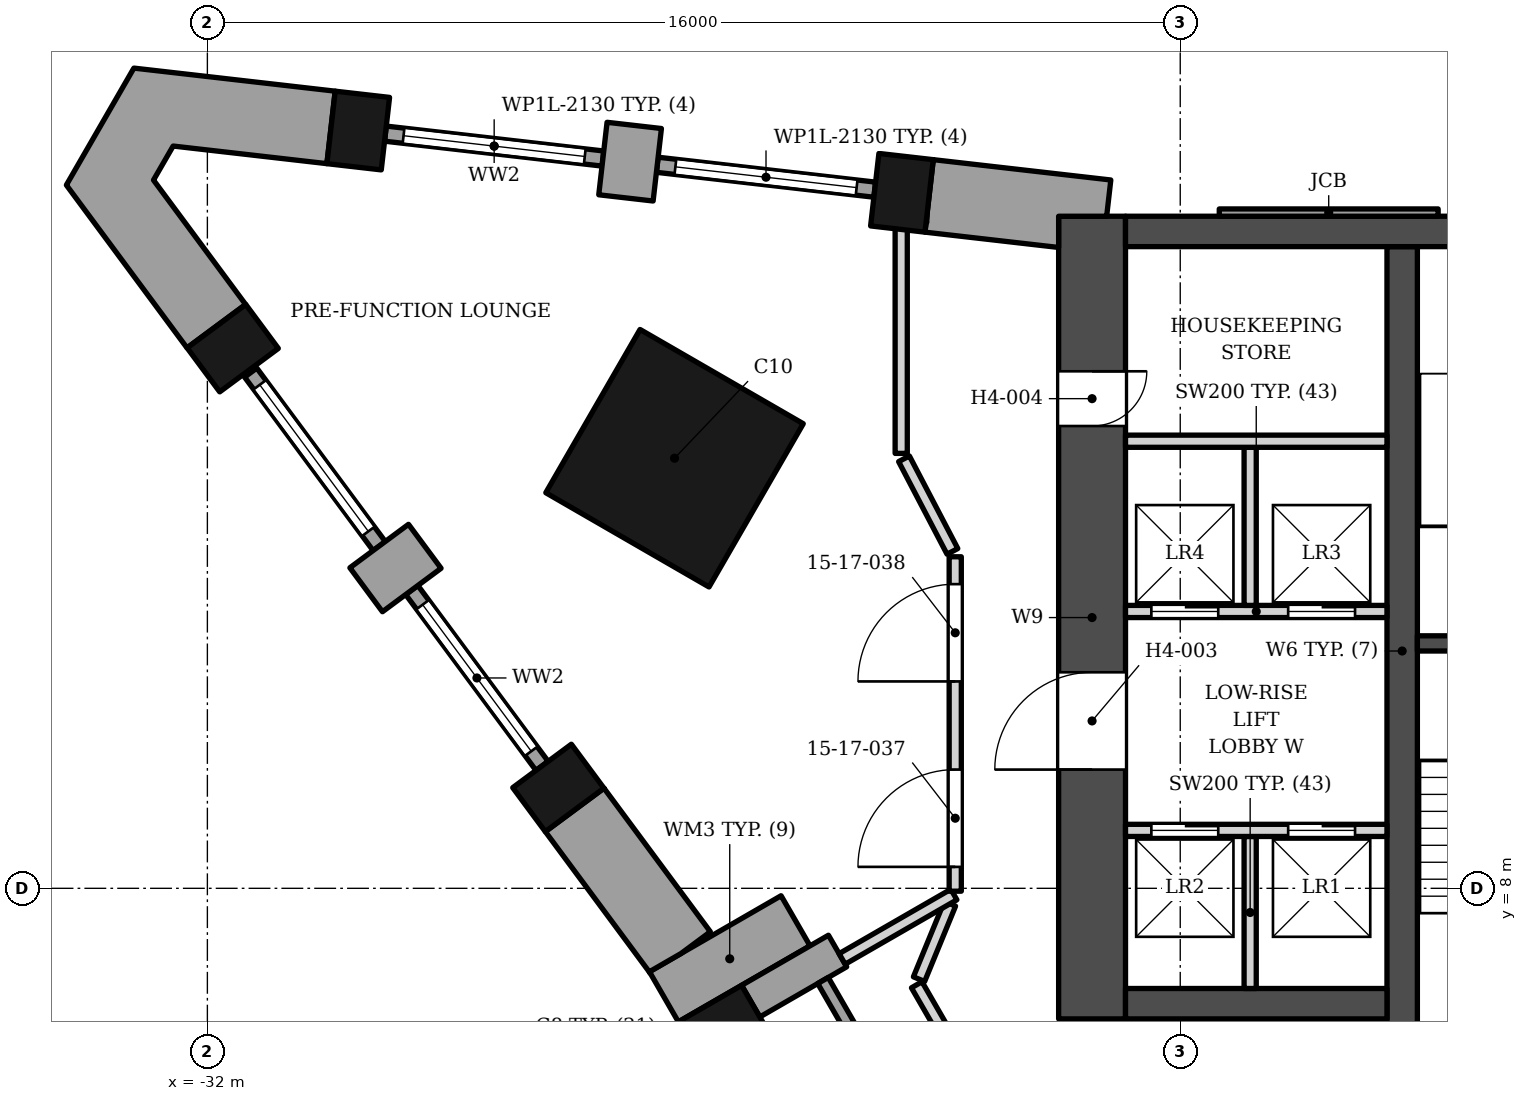
"""IFC4 building model, lengths in metres.
Left out: names, types, materials, properties, quantities, classifications, styles, units other than length and angle.
Written with IfcOpenShell. Run it as: python <this file> out.ifc"""

import sys

from ifc_helpers import new_model, si_unit, direction, frame, frame_2d, origin, origin_2d, place, context, subcontext, project, spatial, polyline, rectangle, outline, extrude, element, fill, save


model = new_model("IFC4")
c1 = context("Model", 3, precision=1e-05, world=origin(), true_north=direction((0.0, 1.0)))
c2 = subcontext(c1, "Body", "Model", "MODEL_VIEW")
j1 = project(units=[si_unit("LENGTHUNIT", "METRE"), si_unit("PLANEANGLEUNIT", "RADIAN")], contexts=[c1])
p1 = place(None, origin())
s1 = spatial("IfcSite", under=j1, at=p1, CompositionType="ELEMENT")
p2 = place(p1, origin())
s2 = spatial("IfcBuilding", under=s1, at=p2, CompositionType="ELEMENT")
p3 = place(p2, frame((0.0, 0.0, 76.6)))
s3 = spatial("IfcBuildingStorey", under=s2, at=p3, CompositionType="ELEMENT", Elevation=76.6)
p4 = place(p3, frame((-16.9, 18.802, 0.0), z_axis=(0.0, 0.0, 1.0), x_axis=(1.0, 0.0, 0.0)))
e1 = element("IfcWall", 1, at=p4, inside=s3, PredefinedType="SHEAR", context=c2, shape_type="SweptSolid", body=[
    extrude(rectangle(XDim=33.8, YDim=0.5, at=frame_2d((16.9, 0.0))), origin(), (0.0, 0.0, 1.0), 3.4),
])
p5 = place(p3, frame((-12.35, 5.253, 0.0), z_axis=(0.0, 0.0, 1.0), x_axis=(0.0, 1.0, 0.0)))
e2 = element("IfcWall", 2, at=p5, inside=s3, PredefinedType="SHEAR", context=c2, shape_type="SweptSolid", body=[
    extrude(rectangle(XDim=13.3, YDim=0.5, at=frame_2d((6.65, 0.0))), origin(), (0.0, 0.0, 1.0), 3.4),
])
p6 = place(p3, frame((-12.1, 12.028, 0.0), z_axis=(0.0, 0.0, 1.0), x_axis=(1.0, 0.0, 0.0)))
e3 = element("IfcWall", 3, at=p6, inside=s3, PredefinedType="SHEAR", context=c2, shape_type="SweptSolid", body=[
    extrude(rectangle(XDim=3.75, YDim=0.25, at=frame_2d((1.875, 0.0))), origin(), (0.0, 0.0, 1.0), 3.4),
])
p7 = place(p3, frame((-12.6, 6.103, 0.0), z_axis=(0.0, 0.0, 1.0), x_axis=(-1.0, 0.0, 0.0)))
e4 = element("IfcWall", 4, at=p7, inside=s3, PredefinedType="SHEAR", context=c2, shape_type="SweptSolid", body=[
    extrude(rectangle(XDim=4.3, YDim=0.5, at=frame_2d((2.15, 0.0))), origin(), (0.0, 0.0, 1.0), 3.4),
])
p8 = place(p3, frame((-17.45, 5.853, 0.0), z_axis=(0.0, 0.0, 1.0), x_axis=(0.0, 1.0, 0.0)))
e5 = element("IfcWall", 5, at=p8, inside=s3, PredefinedType="SHEAR", context=c2, shape_type="SweptSolid", body=[
    extrude(rectangle(XDim=13.2, YDim=1.1, at=frame_2d((6.6, 0.0))), origin(), (0.0, 0.0, 1.0), 3.4),
])
p9 = place(p8, frame((4.1, 0.0, 0.0)))
e6 = element("IfcOpeningElement", 6, at=p9, cuts=e5, PredefinedType="OPENING", context=c2, shape_type="SweptSolid", body=[
    extrude(rectangle(XDim=1.6, YDim=2.1, at=frame_2d((0.8, 1.05))), frame((0.0, 0.56, 0.0), z_axis=(0.0, -1.0, 0.0), x_axis=(1.0, 0.0, 0.0)), (0.0, 0.0, 1.0), 1.12),
])
p10 = place(p8, frame((9.75, 0.0, 0.0)))
e7 = element("IfcOpeningElement", 7, at=p10, cuts=e5, PredefinedType="OPENING", context=c2, shape_type="SweptSolid", body=[
    extrude(rectangle(XDim=0.9, YDim=2.1, at=frame_2d((0.45, 1.05))), frame((0.0, 0.56, 0.0), z_axis=(0.0, -1.0, 0.0), x_axis=(1.0, 0.0, 0.0)), (0.0, 0.0, 1.0), 1.12),
])
p11 = place(p3, frame((-24.317, 15.073, 0.0), z_axis=(0.0, 0.0, 1.0), x_axis=(0.866025412511, -0.499999984885, 0.0)))
e8 = element("IfcColumn", 8, at=p11, inside=s3, PredefinedType="COLUMN", context=c2, shape_type="SweptSolid", body=[
    extrude(rectangle(XDim=3.1, YDim=3.1, at=origin_2d()), origin(), (0.0, 0.0, 1.0), 3.4),
])
for number, where, z_axis, x_axis in (
    (9, (-23.509, 5.714, 0.0), (0.0, 0.0, 1.0), (0.5, -0.866, 0.0)),
    (10, (-20.577, 19.438, 0.0), (0.0, 0.0, 1.0), (-0.994, 0.114, 0.0)),
    (11, (-29.519, 20.462, 0.0), (0.0, 0.0, 1.0), (-0.994, 0.114, 0.0)),
    (12, (-31.583, 16.883, 0.0), (0.0, 0.0, 1.0), (0.595, -0.804, 0.0)),
    (13, (-26.228, 9.651, 0.0), (0.0, 0.0, 1.0), (0.595, -0.804, 0.0)),
):
    element("IfcColumn", number, at=place(p3, frame(where, z_axis=z_axis, x_axis=x_axis)), inside=s3, PredefinedType="COLUMN", context=c2, shape_type="SweptSolid", body=[
        extrude(rectangle(XDim=0.9, YDim=1.2, at=origin_2d()), origin(), (0.0, 0.0, 1.0), 3.4),
    ])
p12 = place(p3, frame((-21.635, 6.969, 0.0), z_axis=(0.0, 0.0, 1.0), x_axis=(-0.866040211805, -0.499974350878, 0.0)))
e14 = element("IfcWall", 14, at=p12, inside=s3, PredefinedType="SOLIDWALL", context=c2, shape_type="SweptSolid", body=[
    extrude(rectangle(XDim=1.65, YDim=0.6, at=frame_2d((0.825, 0.0))), origin(), (0.0, 0.0, 1.0), 2.65),
])
p13 = place(p3, frame((-21.875, 6.484, 0.0), z_axis=(0.0, 0.0, 1.0), x_axis=(0.49998411664, -0.866034573852, 0.0)))
e15 = element("IfcWall", 15, at=p13, inside=s3, PredefinedType="ELEMENTEDWALL", context=c2, shape_type="SweptSolid", body=[
    extrude(rectangle(XDim=4.2, YDim=0.2, at=frame_2d((2.1, 0.0))), origin(), (0.0, 0.0, 1.0), 2.45),
])
p14 = place(p3, origin())
e16 = element("IfcWall", 16, at=p14, inside=s3, PredefinedType="SOLIDWALL", context=c2, shape_type="SweptSolid", body=[
    extrude(outline(polyline([(-15.358, 19.173), (-15.358, 19.052), (-11.758, 19.052), (-11.758, 19.173), (-15.358, 19.173)])), origin(), (0.0, 0.0, 1.0), 2.65),
])
p15 = place(p3, frame((-22.327, 7.466, 0.0), z_axis=(0.0, 0.0, 1.0), x_axis=(-0.866022959057, -0.500004234368, 0.0)))
e17 = element("IfcWall", 17, at=p15, inside=s3, PredefinedType="SOLIDWALL", context=c2, shape_type="SweptSolid", body=[
    extrude(rectangle(XDim=2.5, YDim=0.952, at=frame_2d((1.25, 0.0))), origin(), (0.0, 0.0, 1.0), 2.63),
])
p16 = place(p3, frame((-25.116, 19.354, 0.0), z_axis=(0.0, 0.0, 1.0), x_axis=(0.113735952551, 0.993511013073, 0.0)))
e18 = element("IfcWall", 18, at=p16, inside=s3, PredefinedType="SOLIDWALL", context=c2, shape_type="SweptSolid", body=[
    extrude(rectangle(XDim=1.2, YDim=0.9, at=frame_2d((0.6, 0.0))), origin(), (0.0, 0.0, 1.0), 2.63),
])
p17 = place(p3, frame((-21.024, 19.489, 0.0), z_axis=(0.0, 0.0, 1.0), x_axis=(-0.993504225498, 0.113795228013, 0.0)))
e19 = element("IfcWall", 19, at=p17, inside=s3, PredefinedType="ELEMENTEDWALL", context=c2, shape_type="SweptSolid", body=[
    extrude(rectangle(XDim=3.6, YDim=0.25, at=frame_2d((1.8, 0.0))), origin(), (0.0, 0.0, 1.0), 2.63),
])
p18 = place(p17, frame((0.3, 0.0, 0.3)))
e20 = element("IfcOpeningElement", 20, at=p18, cuts=e19, PredefinedType="OPENING", context=c2, shape_type="SweptSolid", body=[
    extrude(rectangle(XDim=3.0, YDim=2.13, at=frame_2d((1.5, 1.065))), frame((0.0, 0.135, 0.0), z_axis=(0.0, -1.0, 0.0), x_axis=(1.0, 0.0, 0.0)), (0.0, 0.0, 1.0), 0.27),
])
p19 = place(p3, frame((-25.495, 20.001, 0.0), z_axis=(0.0, 0.0, 1.0), x_axis=(-0.993511890309, 0.113728289423, 0.0)))
e21 = element("IfcWall", 21, at=p19, inside=s3, PredefinedType="ELEMENTEDWALL", context=c2, shape_type="SweptSolid", body=[
    extrude(rectangle(XDim=3.6, YDim=0.25, at=frame_2d((1.8, 0.0))), origin(), (0.0, 0.0, 1.0), 2.63),
])
p20 = place(p19, frame((0.3, 0.0, 0.3)))
e22 = element("IfcOpeningElement", 22, at=p20, cuts=e21, PredefinedType="OPENING", context=c2, shape_type="SweptSolid", body=[
    extrude(rectangle(XDim=3.0, YDim=2.13, at=frame_2d((1.5, 1.065))), frame((0.0, 0.135, 0.0), z_axis=(0.0, -1.0, 0.0), x_axis=(1.0, 0.0, 0.0)), (0.0, 0.0, 1.0), 0.27),
])
p21 = place(p3, frame((-29.388, 12.91, 0.0), z_axis=(0.0, 0.0, 1.0), x_axis=(0.803477891264, 0.595334593527, 0.0)))
e23 = element("IfcWall", 23, at=p21, inside=s3, PredefinedType="SOLIDWALL", context=c2, shape_type="SweptSolid", body=[
    extrude(rectangle(XDim=1.2, YDim=0.9, at=frame_2d((0.6, 0.0))), origin(), (0.0, 0.0, 1.0), 2.63),
])
p22 = place(p3, frame((-31.288, 16.481, 0.0), z_axis=(0.0, 0.0, 1.0), x_axis=(0.595304805086, -0.803499962067, 0.0)))
e24 = element("IfcWall", 24, at=p22, inside=s3, PredefinedType="ELEMENTEDWALL", context=c2, shape_type="SweptSolid", body=[
    extrude(rectangle(XDim=3.552, YDim=0.25, at=frame_2d((1.776, 0.0))), origin(), (0.0, 0.0, 1.0), 2.63),
])
p23 = place(p22, frame((0.25, 0.0, 0.3)))
e25 = element("IfcOpeningElement", 25, at=p23, cuts=e24, PredefinedType="OPENING", context=c2, shape_type="SweptSolid", body=[
    extrude(rectangle(XDim=3.0, YDim=2.13, at=frame_2d((1.5, 1.065))), frame((0.0, 0.135, 0.0), z_axis=(0.0, -1.0, 0.0), x_axis=(1.0, 0.0, 0.0)), (0.0, 0.0, 1.0), 0.27),
])
p24 = place(p3, frame((-28.638, 12.906, 0.0), z_axis=(0.0, 0.0, 1.0), x_axis=(0.595302153335, -0.803501926715, 0.0)))
e26 = element("IfcWall", 26, at=p24, inside=s3, PredefinedType="ELEMENTEDWALL", context=c2, shape_type="SweptSolid", body=[
    extrude(rectangle(XDim=3.6, YDim=0.25, at=frame_2d((1.8, 0.0))), origin(), (0.0, 0.0, 1.0), 2.63),
])
p25 = place(p24, frame((0.3, 0.0, 0.3)))
e27 = element("IfcOpeningElement", 27, at=p25, cuts=e26, PredefinedType="OPENING", context=c2, shape_type="SweptSolid", body=[
    extrude(rectangle(XDim=3.0, YDim=2.13, at=frame_2d((1.5, 1.065))), frame((0.0, 0.135, 0.0), z_axis=(0.0, -1.0, 0.0), x_axis=(1.0, 0.0, 0.0)), (0.0, 0.0, 1.0), 0.27),
])
p26 = place(p3, origin())
e28 = element("IfcWall", 28, at=p26, inside=s3, PredefinedType="SOLIDWALL", context=c2, shape_type="SweptSolid", body=[
    extrude(outline(polyline([(-20.062, 19.983), (-20.198, 18.791), (-18.0, 18.539), (-18.0, 19.052), (-17.21, 19.052), (-17.142, 19.649), (-20.062, 19.983), (-20.062, 19.983), (-20.062, 19.983)])), origin(), (0.0, 0.0, 1.0), 2.473),
])
p27 = place(p3, origin())
e29 = element("IfcWall", 29, at=p27, inside=s3, PredefinedType="SOLIDWALL", context=c2, shape_type="SweptSolid", body=[
    extrude(outline(polyline([(-29.898, 21.109), (-33.209, 21.489), (-34.319, 19.565), (-32.335, 16.887), (-31.371, 17.602), (-32.886, 19.647), (-32.563, 20.207), (-30.034, 19.917), (-29.898, 21.109)])), origin(), (0.0, 0.0, 1.0), 2.65),
])
p28 = place(p3, origin())
e30 = element("IfcWall", 30, at=p28, inside=s3, PredefinedType="SOLIDWALL", context=c2, shape_type="SweptSolid", body=[
    extrude(outline(polyline([(-23.728, 7.285), (-25.478, 9.647), (-25.478, 9.647), (-25.478, 9.646), (-26.442, 8.933), (-24.713, 6.599), (-24.73, 6.628), (-24.21, 6.928), (-23.728, 7.285)])), origin(), (0.0, 0.0, 1.0), 2.63),
])
p29 = place(p3, frame((-14.85, 6.353, 0.0), z_axis=(0.0, 0.0, 1.0), x_axis=(0.0, 1.0, 0.0)))
e31 = element("IfcWall", 31, at=p29, inside=s3, PredefinedType="SOLIDWALL", context=c2, shape_type="SweptSolid", body=[
    extrude(rectangle(XDim=2.5, YDim=0.2, at=frame_2d((1.25, 0.0))), origin(), (0.0, 0.0, 1.0), 3.23),
])
p30 = place(p3, frame((-16.9, 8.953, 0.0), z_axis=(0.0, 0.0, 1.0), x_axis=(1.0, 0.0, 0.0)))
e32 = element("IfcWall", 32, at=p30, inside=s3, PredefinedType="SOLIDWALL", context=c2, shape_type="SweptSolid", body=[
    extrude(rectangle(XDim=4.3, YDim=0.2, at=frame_2d((2.15, 0.0))), origin(), (0.0, 0.0, 1.0), 3.23),
])
p31 = place(p30, frame((2.675, 0.0, 0.0)))
e33 = element("IfcOpeningElement", 33, at=p31, cuts=e32, PredefinedType="OPENING", context=c2, shape_type="SweptSolid", body=[
    extrude(rectangle(XDim=1.1, YDim=2.1, at=frame_2d((0.55, 1.05))), frame((0.0, 0.11, 0.0), z_axis=(0.0, -1.0, 0.0), x_axis=(1.0, 0.0, 0.0)), (0.0, 0.0, 1.0), 0.22),
])
p32 = place(p30, frame((0.425, 0.0, 0.0)))
e34 = element("IfcOpeningElement", 34, at=p32, cuts=e32, PredefinedType="OPENING", context=c2, shape_type="SweptSolid", body=[
    extrude(rectangle(XDim=1.1, YDim=2.1, at=frame_2d((0.55, 1.05))), frame((0.0, 0.11, 0.0), z_axis=(0.0, -1.0, 0.0), x_axis=(1.0, 0.0, 0.0)), (0.0, 0.0, 1.0), 0.22),
])
p33 = place(p3, frame((-16.9, 12.552, 0.0), z_axis=(0.0, 0.0, 1.0), x_axis=(1.0, 0.0, 0.0)))
e35 = element("IfcWall", 35, at=p33, inside=s3, PredefinedType="SOLIDWALL", context=c2, shape_type="SweptSolid", body=[
    extrude(rectangle(XDim=4.3, YDim=0.2, at=frame_2d((2.15, 0.0))), origin(), (0.0, 0.0, 1.0), 3.23),
])
p34 = place(p33, frame((2.675, 0.0, 0.0)))
e36 = element("IfcOpeningElement", 36, at=p34, cuts=e35, PredefinedType="OPENING", context=c2, shape_type="SweptSolid", body=[
    extrude(rectangle(XDim=1.1, YDim=2.1, at=frame_2d((0.55, 1.05))), frame((0.0, 0.11, 0.0), z_axis=(0.0, -1.0, 0.0), x_axis=(1.0, 0.0, 0.0)), (0.0, 0.0, 1.0), 0.22),
])
p35 = place(p33, frame((0.425, 0.0, 0.0)))
e37 = element("IfcOpeningElement", 37, at=p35, cuts=e35, PredefinedType="OPENING", context=c2, shape_type="SweptSolid", body=[
    extrude(rectangle(XDim=1.1, YDim=2.1, at=frame_2d((0.55, 1.05))), frame((0.0, 0.11, 0.0), z_axis=(0.0, -1.0, 0.0), x_axis=(1.0, 0.0, 0.0)), (0.0, 0.0, 1.0), 0.22),
])
p36 = place(p3, frame((-14.85, 12.653, 0.0), z_axis=(0.0, 0.0, 1.0), x_axis=(0.0, 1.0, 0.0)))
e38 = element("IfcWall", 38, at=p36, inside=s3, PredefinedType="SOLIDWALL", context=c2, shape_type="SweptSolid", body=[
    extrude(rectangle(XDim=2.6, YDim=0.2, at=frame_2d((1.3, 0.0))), origin(), (0.0, 0.0, 1.0), 3.23),
])
p37 = place(p3, frame((-16.9, 15.353, 0.0), z_axis=(0.0, 0.0, 1.0), x_axis=(1.0, 0.0, 0.0)))
e39 = element("IfcWall", 39, at=p37, inside=s3, PredefinedType="SOLIDWALL", context=c2, shape_type="SweptSolid", body=[
    extrude(rectangle(XDim=4.3, YDim=0.2, at=frame_2d((2.15, 0.0))), origin(), (0.0, 0.0, 1.0), 3.23),
])
p38 = place(p3, frame((-20.334, 6.414, 0.0), z_axis=(0.0, 0.0, 1.0), x_axis=(0.499991774685, -0.86603015262, 0.0)))
e40 = element("IfcWall", 40, at=p38, inside=s3, PredefinedType="PARTITIONING", context=c2, shape_type="SweptSolid", body=[
    extrude(rectangle(XDim=2.903, YDim=0.2, at=frame_2d((1.452, 0.0))), origin(), (0.0, 0.0, 1.0), 2.45),
])
p39 = place(p38, frame((1.002, 0.0, 0.0)))
e41 = element("IfcOpeningElement", 41, at=p39, cuts=e40, PredefinedType="OPENING", context=c2, shape_type="SweptSolid", body=[
    extrude(rectangle(XDim=0.9, YDim=2.1, at=frame_2d((0.45, 1.05))), frame((0.0, 0.11, 0.0), z_axis=(0.0, -1.0, 0.0), x_axis=(1.0, 0.0, 0.0)), (0.0, 0.0, 1.0), 0.22),
])
p40 = place(p3, frame((-20.296, 6.507, 0.0), z_axis=(0.0, 0.0, 1.0), x_axis=(0.379924425103, 0.925017530218, 0.0)))
e42 = element("IfcWall", 42, at=p40, inside=s3, PredefinedType="PARTITIONING", context=c2, shape_type="SweptSolid", body=[
    extrude(rectangle(XDim=1.339, YDim=0.2, at=frame_2d((0.669, 0.0))), origin(), (0.0, 0.0, 1.0), 2.473),
])
p41 = place(p3, frame((-21.561, 6.839, 0.0), z_axis=(0.0, 0.0, 1.0), x_axis=(0.866480611472, 0.499210726992, 0.0)))
e43 = element("IfcWall", 43, at=p41, inside=s3, PredefinedType="PARTITIONING", context=c2, shape_type="SweptSolid", body=[
    extrude(rectangle(XDim=2.121, YDim=0.2, at=frame_2d((1.06, 0.0))), origin(), (0.0, 0.0, 1.0), 2.473),
])
p42 = place(p3, frame((-19.7, 7.953, 0.0), z_axis=(0.0, 0.0, 1.0), x_axis=(0.0, 1.0, 0.0)))
e44 = element("IfcWall", 44, at=p42, inside=s3, PredefinedType="PARTITIONING", context=c2, shape_type="SweptSolid", body=[
    extrude(rectangle(XDim=5.5, YDim=0.2, at=frame_2d((2.75, 0.0))), origin(), (0.0, 0.0, 1.0), 3.23),
])
p43 = place(p42, frame((0.4, 0.0, 0.0)))
e45 = element("IfcOpeningElement", 45, at=p43, cuts=e44, PredefinedType="OPENING", context=c2, shape_type="SweptSolid", body=[
    extrude(rectangle(XDim=1.6, YDim=2.1, at=frame_2d((0.8, 1.05))), frame((0.0, 0.11, 0.0), z_axis=(0.0, -1.0, 0.0), x_axis=(1.0, 0.0, 0.0)), (0.0, 0.0, 1.0), 0.22),
])
p44 = place(p42, frame((3.45, 0.0, 0.0)))
e46 = element("IfcOpeningElement", 46, at=p44, cuts=e44, PredefinedType="OPENING", context=c2, shape_type="SweptSolid", body=[
    extrude(rectangle(XDim=1.6, YDim=2.1, at=frame_2d((0.8, 1.05))), frame((0.0, 0.11, 0.0), z_axis=(0.0, -1.0, 0.0), x_axis=(1.0, 0.0, 0.0)), (0.0, 0.0, 1.0), 0.22),
])
p45 = place(p3, frame((-20.543, 15.064, 0.0), z_axis=(0.0, 0.0, 1.0), x_axis=(0.463226309124, -0.886240027609, 0.0)))
e47 = element("IfcWall", 47, at=p45, inside=s3, PredefinedType="PARTITIONING", context=c2, shape_type="SweptSolid", body=[
    extrude(rectangle(XDim=1.718, YDim=0.2, at=frame_2d((0.859, 0.0))), origin(), (0.0, 0.0, 1.0), 2.473),
])
p46 = place(p3, frame((-20.589, 19.052, 0.0), z_axis=(0.0, 0.0, 1.0), x_axis=(0.0, -1.0, 0.0)))
e48 = element("IfcWall", 48, at=p46, inside=s3, PredefinedType="PARTITIONING", context=c2, shape_type="SweptSolid", body=[
    extrude(rectangle(XDim=3.9, YDim=0.2, at=frame_2d((1.95, 0.0))), origin(), (0.0, 0.0, 1.0), 3.23),
])
p47 = place(p3, frame((-20.489, 19.052, 0.0), z_axis=(0.0, 0.0, 1.0), x_axis=(0.999999710413, 0.000761034787, 0.0)))
e49 = element("IfcWall", 49, at=p47, inside=s3, PredefinedType="PARTITIONING", context=c2, shape_type="SweptSolid", body=[
    extrude(rectangle(XDim=0.321, YDim=0.2, at=frame_2d((0.16, 0.0))), origin(), (0.0, 0.0, 1.0), 3.23),
])
p48 = place(p18, origin())
e50 = element("IfcWindow", 50, at=p48, inside=s3, PartitioningType="SINGLE_PANEL", PredefinedType="WINDOW", context=c2, shape_type="SweptSolid", body=[
    extrude(rectangle(XDim=3.0, YDim=2.13, at=frame_2d((1.5, 1.065))), frame((0.0, 0.03, 0.0), z_axis=(0.0, -1.0, 0.0), x_axis=(1.0, 0.0, 0.0)), (0.0, 0.0, 1.0), 0.06),
])
fill(e20, e50)
p49 = place(p20, origin())
e51 = element("IfcWindow", 51, at=p49, inside=s3, PartitioningType="SINGLE_PANEL", PredefinedType="WINDOW", context=c2, shape_type="SweptSolid", body=[
    extrude(rectangle(XDim=3.0, YDim=2.13, at=frame_2d((1.5, 1.065))), frame((0.0, 0.03, 0.0), z_axis=(0.0, -1.0, 0.0), x_axis=(1.0, 0.0, 0.0)), (0.0, 0.0, 1.0), 0.06),
])
fill(e22, e51)
p50 = place(p23, origin())
e52 = element("IfcWindow", 52, at=p50, inside=s3, PartitioningType="SINGLE_PANEL", PredefinedType="WINDOW", context=c2, shape_type="SweptSolid", body=[
    extrude(rectangle(XDim=3.0, YDim=2.13, at=frame_2d((1.5, 1.065))), frame((0.0, 0.03, 0.0), z_axis=(0.0, -1.0, 0.0), x_axis=(1.0, 0.0, 0.0)), (0.0, 0.0, 1.0), 0.06),
])
fill(e25, e52)
p51 = place(p25, origin())
e53 = element("IfcWindow", 53, at=p51, inside=s3, PartitioningType="SINGLE_PANEL", PredefinedType="WINDOW", context=c2, shape_type="SweptSolid", body=[
    extrude(rectangle(XDim=3.0, YDim=2.13, at=frame_2d((1.5, 1.065))), frame((0.0, 0.03, 0.0), z_axis=(0.0, -1.0, 0.0), x_axis=(1.0, 0.0, 0.0)), (0.0, 0.0, 1.0), 0.06),
])
fill(e27, e53)
p52 = place(p31, origin())
e54 = element("IfcDoor", 54, at=p52, inside=s3, OperationType="DOUBLE_DOOR_SLIDING", PredefinedType="DOOR", context=c2, shape_type="SweptSolid", body=[
    extrude(rectangle(XDim=1.1, YDim=2.1, at=frame_2d((0.55, 1.05))), frame((0.0, 0.025, 0.0), z_axis=(0.0, -1.0, 0.0), x_axis=(1.0, 0.0, 0.0)), (0.0, 0.0, 1.0), 0.05),
])
fill(e33, e54)
p53 = place(p34, origin())
e55 = element("IfcDoor", 55, at=p53, inside=s3, OperationType="DOUBLE_DOOR_SLIDING", PredefinedType="DOOR", context=c2, shape_type="SweptSolid", body=[
    extrude(rectangle(XDim=1.1, YDim=2.1, at=frame_2d((0.55, 1.05))), frame((0.0, 0.025, 0.0), z_axis=(0.0, -1.0, 0.0), x_axis=(1.0, 0.0, 0.0)), (0.0, 0.0, 1.0), 0.05),
])
fill(e36, e55)
p54 = place(p32, origin())
e56 = element("IfcDoor", 56, at=p54, inside=s3, OperationType="DOUBLE_DOOR_SLIDING", PredefinedType="DOOR", context=c2, shape_type="SweptSolid", body=[
    extrude(rectangle(XDim=1.1, YDim=2.1, at=frame_2d((0.55, 1.05))), frame((0.0, 0.025, 0.0), z_axis=(0.0, -1.0, 0.0), x_axis=(1.0, 0.0, 0.0)), (0.0, 0.0, 1.0), 0.05),
])
fill(e34, e56)
p55 = place(p35, origin())
e57 = element("IfcDoor", 57, at=p55, inside=s3, OperationType="DOUBLE_DOOR_SLIDING", PredefinedType="DOOR", context=c2, shape_type="SweptSolid", body=[
    extrude(rectangle(XDim=1.1, YDim=2.1, at=frame_2d((0.55, 1.05))), frame((0.0, 0.025, 0.0), z_axis=(0.0, -1.0, 0.0), x_axis=(1.0, 0.0, 0.0)), (0.0, 0.0, 1.0), 0.05),
])
fill(e37, e57)
p56 = place(p9, origin())
e58 = element("IfcDoor", 58, at=p56, inside=s3, OperationType="DOUBLE_DOOR_SINGLE_SWING", PredefinedType="DOOR", context=c2, shape_type="SweptSolid", body=[
    extrude(rectangle(XDim=1.6, YDim=2.1, at=frame_2d((0.8, 1.05))), frame((0.0, -0.225, 0.0), z_axis=(0.0, -1.0, 0.0), x_axis=(1.0, 0.0, 0.0)), (0.0, 0.0, 1.0), 0.05),
])
fill(e6, e58)
p57 = place(p10, origin())
e59 = element("IfcDoor", 59, at=p57, inside=s3, OperationType="SINGLE_SWING_RIGHT", PredefinedType="DOOR", context=c2, shape_type="SweptSolid", body=[
    extrude(rectangle(XDim=0.9, YDim=2.1, at=frame_2d((0.45, 1.05))), frame((0.0, -0.225, 0.0), z_axis=(0.0, -1.0, 0.0), x_axis=(1.0, 0.0, 0.0)), (0.0, 0.0, 1.0), 0.05),
])
fill(e7, e59)
p58 = place(p43, origin())
e60 = element("IfcDoor", 60, at=p58, inside=s3, OperationType="DOUBLE_DOOR_SINGLE_SWING", PredefinedType="DOOR", context=c2, shape_type="SweptSolid", body=[
    extrude(rectangle(XDim=1.6, YDim=2.1, at=frame_2d((0.8, 1.05))), frame((0.0, 0.025, 0.0), z_axis=(0.0, -1.0, 0.0), x_axis=(1.0, 0.0, 0.0)), (0.0, 0.0, 1.0), 0.05),
])
fill(e45, e60)
p59 = place(p44, origin())
e61 = element("IfcDoor", 61, at=p59, inside=s3, OperationType="DOUBLE_DOOR_SINGLE_SWING", PredefinedType="DOOR", context=c2, shape_type="SweptSolid", body=[
    extrude(rectangle(XDim=1.6, YDim=2.1, at=frame_2d((0.8, 1.05))), frame((0.0, 0.025, 0.0), z_axis=(0.0, -1.0, 0.0), x_axis=(1.0, 0.0, 0.0)), (0.0, 0.0, 1.0), 0.05),
])
fill(e46, e61)
save(model, sys.argv[1])
